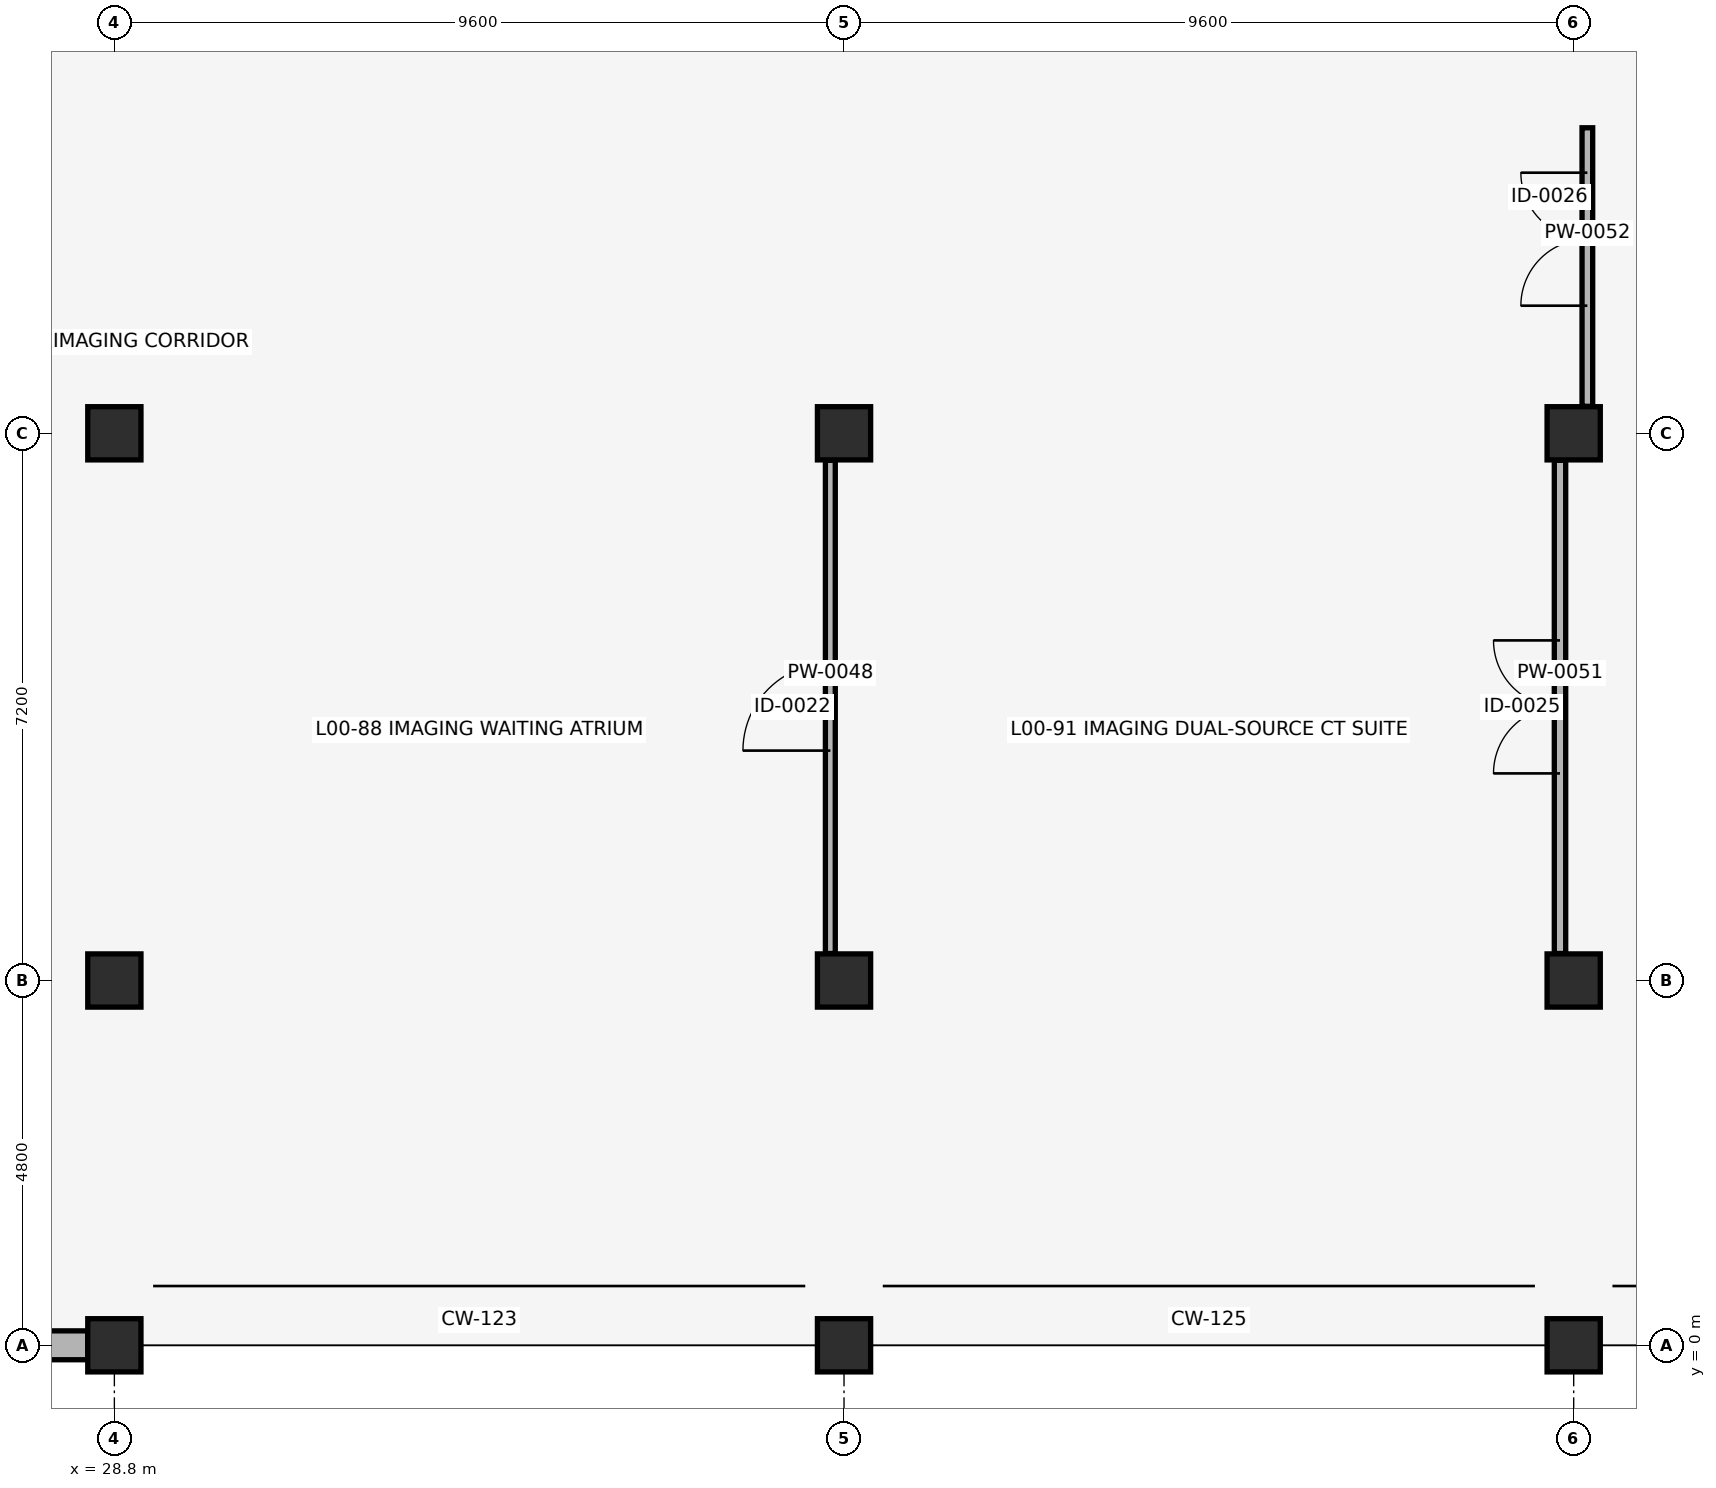
"""IFC4 building model, lengths in metres.
Left out: names, types, materials, properties, quantities, classifications, styles, units other than length and angle.
Written with IfcOpenShell. Run it as: python <this file> out.ifc"""

import sys

from ifc_helpers import new_model, si_unit, direction, frame, frame_2d, origin, origin_2d, place, context, subcontext, project, spatial, rectangle, circle, extrude, element, fill, save


model = new_model("IFC4")
c1 = context("Model", 3, precision=1e-05, world=origin(), true_north=direction((0.0, 1.0)))
c2 = subcontext(c1, "Body", "Model", "MODEL_VIEW")
j1 = project(units=[si_unit("LENGTHUNIT", "METRE"), si_unit("PLANEANGLEUNIT", "RADIAN")], contexts=[c1])
p1 = place(None, origin())
s1 = spatial("IfcSite", under=j1, at=p1, CompositionType="ELEMENT")
p2 = place(p1, origin())
s2 = spatial("IfcBuilding", under=s1, at=p2, CompositionType="ELEMENT")
p3 = place(p2, origin())
s3 = spatial("IfcBuildingStorey", under=s2, at=p3, CompositionType="ELEMENT", Elevation=0.0)
for number, where, z_axis, x_axis in (
    (1, (28.8, 0.0, 0.0), (0.0, 0.0, 1.0), (1.0, 0.0, 0.0)),
    (2, (28.8, 4.8, 0.0), (0.0, 0.0, 1.0), (1.0, 0.0, 0.0)),
    (3, (28.8, 12.0, 0.0), (0.0, 0.0, 1.0), (1.0, 0.0, 0.0)),
    (4, (38.4, 0.0, 0.0), (0.0, 0.0, 1.0), (1.0, 0.0, 0.0)),
    (5, (38.4, 4.8, 0.0), (0.0, 0.0, 1.0), (1.0, 0.0, 0.0)),
    (6, (38.4, 12.0, 0.0), (0.0, 0.0, 1.0), (1.0, 0.0, 0.0)),
    (7, (48.0, 0.0, 0.0), (0.0, 0.0, 1.0), (1.0, 0.0, 0.0)),
    (8, (48.0, 4.8, 0.0), (0.0, 0.0, 1.0), (1.0, 0.0, 0.0)),
    (9, (48.0, 12.0, 0.0), (0.0, 0.0, 1.0), (1.0, 0.0, 0.0)),
):
    element("IfcColumn", number, at=place(p3, frame(where, z_axis=z_axis, x_axis=x_axis)), inside=s3, PredefinedType="COLUMN", context=c2, shape_type="SweptSolid", body=[
        extrude(circle(Radius=0.35, at=origin_2d()), origin(), (0.0, 0.0, 1.0), 4.42),
    ])
p4 = place(p3, frame((19.55, 0.0, 0.0), z_axis=(0.0, 0.0, 1.0), x_axis=(1.0, 0.0, 0.0)))
e10 = element("IfcWall", 10, at=p4, inside=s3, PredefinedType="SOLIDWALL", context=c2, shape_type="SweptSolid", body=[
    extrude(rectangle(XDim=8.9, YDim=0.38, at=frame_2d((4.45, 0.0))), origin(), (0.0, 0.0, 1.0), 3.31),
])
p5 = place(p4, frame((3.4, 0.0, 0.0)))
e11 = element("IfcOpeningElement", 11, at=p5, cuts=e10, PredefinedType="OPENING", context=c2, shape_type="SweptSolid", body=[
    extrude(rectangle(XDim=2.1, YDim=2.3, at=frame_2d((1.05, 1.15))), frame((0.0, 0.2, 0.0), z_axis=(0.0, -1.0, 0.0), x_axis=(1.0, 0.0, 0.0)), (0.0, 0.0, 1.0), 0.4),
])
p6 = place(p3, frame((38.22, 5.155, 0.0), z_axis=(0.0, 0.0, 1.0), x_axis=(0.0, 1.0, 0.0)))
e12 = element("IfcWall", 12, at=p6, inside=s3, PredefinedType="PARTITIONING", context=c2, shape_type="SweptSolid", body=[
    extrude(rectangle(XDim=6.49, YDim=0.13, at=frame_2d((3.245, 0.0))), origin(), (0.0, 0.0, 1.0), 3.31),
])
p7 = place(p6, frame((2.67, 0.0, 0.0)))
e13 = element("IfcOpeningElement", 13, at=p7, cuts=e12, PredefinedType="OPENING", context=c2, shape_type="SweptSolid", body=[
    extrude(rectangle(XDim=1.15, YDim=2.1, at=frame_2d((0.575, 1.05))), frame((0.0, 0.075, 0.0), z_axis=(0.0, -1.0, 0.0), x_axis=(1.0, 0.0, 0.0)), (0.0, 0.0, 1.0), 0.15),
])
p8 = place(p3, frame((47.82, 5.155, 0.0), z_axis=(0.0, 0.0, 1.0), x_axis=(0.0, 1.0, 0.0)))
e14 = element("IfcWall", 14, at=p8, inside=s3, PredefinedType="PARTITIONING", context=c2, shape_type="SweptSolid", body=[
    extrude(rectangle(XDim=6.49, YDim=0.15, at=frame_2d((3.245, 0.0))), origin(), (0.0, 0.0, 1.0), 3.31),
])
p9 = place(p8, frame((2.37, 0.0, 0.0)))
e15 = element("IfcOpeningElement", 15, at=p9, cuts=e14, PredefinedType="OPENING", context=c2, shape_type="SweptSolid", body=[
    extrude(rectangle(XDim=1.75, YDim=2.15, at=frame_2d((0.875, 1.075))), frame((0.0, 0.085, 0.0), z_axis=(0.0, -1.0, 0.0), x_axis=(1.0, 0.0, 0.0)), (0.0, 0.0, 1.0), 0.17),
])
p10 = place(p3, frame((48.18, 12.355, 0.0), z_axis=(0.0, 0.0, 1.0), x_axis=(0.0, 1.0, 0.0)))
e16 = element("IfcWall", 16, at=p10, inside=s3, PredefinedType="PARTITIONING", context=c2, shape_type="SweptSolid", body=[
    extrude(rectangle(XDim=3.665, YDim=0.14, at=frame_2d((1.833, 0.0))), origin(), (0.0, 0.0, 1.0), 3.31),
])
p11 = place(p10, frame((1.324, 0.0, 0.0)))
e17 = element("IfcOpeningElement", 17, at=p11, cuts=e16, PredefinedType="OPENING", context=c2, shape_type="SweptSolid", body=[
    extrude(rectangle(XDim=1.75, YDim=2.15, at=frame_2d((0.875, 1.075))), frame((0.0, 0.08, 0.0), z_axis=(0.0, -1.0, 0.0), x_axis=(1.0, 0.0, 0.0)), (0.0, 0.0, 1.0), 0.16),
])
p12 = place(p7, origin())
e18 = element("IfcDoor", 18, at=p12, inside=s3, OperationType="SINGLE_SWING_LEFT", PredefinedType="DOOR", context=c2, shape_type="SweptSolid", body=[
    extrude(rectangle(XDim=1.15, YDim=2.1, at=frame_2d((0.575, 1.05))), frame((0.0, 0.025, 0.0), z_axis=(0.0, -1.0, 0.0), x_axis=(1.0, 0.0, 0.0)), (0.0, 0.0, 1.0), 0.05),
])
fill(e13, e18)
p13 = place(p9, origin())
e19 = element("IfcDoor", 19, at=p13, inside=s3, OperationType="DOUBLE_DOOR_SINGLE_SWING", PredefinedType="DOOR", context=c2, shape_type="SweptSolid", body=[
    extrude(rectangle(XDim=1.75, YDim=2.15, at=frame_2d((0.875, 1.075))), frame((0.0, 0.025, 0.0), z_axis=(0.0, -1.0, 0.0), x_axis=(1.0, 0.0, 0.0)), (0.0, 0.0, 1.0), 0.05),
])
fill(e15, e19)
p14 = place(p11, origin())
e20 = element("IfcDoor", 20, at=p14, inside=s3, OperationType="DOUBLE_DOOR_SINGLE_SWING", PredefinedType="DOOR", context=c2, shape_type="SweptSolid", body=[
    extrude(rectangle(XDim=1.75, YDim=2.15, at=frame_2d((0.875, 1.075))), frame((0.0, 0.025, 0.0), z_axis=(0.0, -1.0, 0.0), x_axis=(1.0, 0.0, 0.0)), (0.0, 0.0, 1.0), 0.05),
])
fill(e17, e20)
save(model, sys.argv[1])
